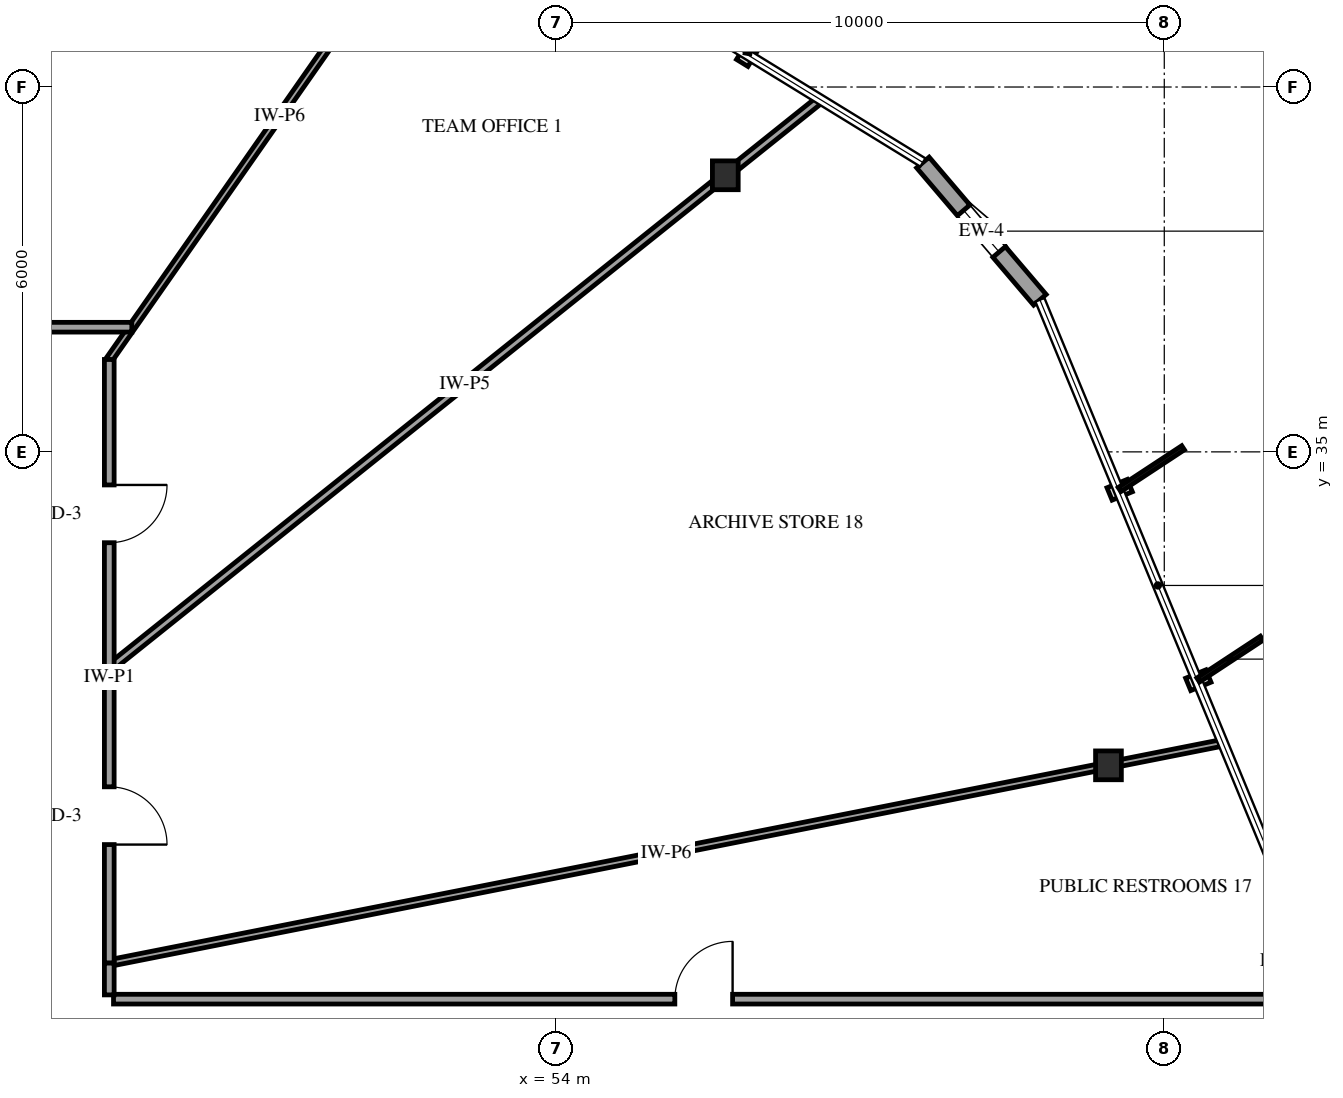
"""IFC4 building model, lengths in metres.
Left out: names, types, materials, properties, quantities, classifications, styles, units other than length and angle.
Written with IfcOpenShell. Run it as: python <this file> out.ifc"""

import sys

from ifc_helpers import new_model, si_unit, direction, frame, frame_2d, origin, origin_2d, place, context, subcontext, project, spatial, rectangle, i_section, extrude, element, fill, save


model = new_model("IFC4")
c1 = context("Model", 3, precision=1e-05, world=origin(), true_north=direction((0.0, 1.0)))
c2 = subcontext(c1, "Body", "Model", "MODEL_VIEW")
j1 = project(units=[si_unit("LENGTHUNIT", "METRE"), si_unit("PLANEANGLEUNIT", "RADIAN")], contexts=[c1])
p1 = place(None, origin())
s1 = spatial("IfcSite", under=j1, at=p1, CompositionType="ELEMENT")
p2 = place(p1, origin())
s2 = spatial("IfcBuilding", under=s1, at=p2, CompositionType="ELEMENT")
p3 = place(p2, frame((0.0, 0.0, 50.6)))
s3 = spatial("IfcBuildingStorey", under=s2, at=p3, CompositionType="ELEMENT", Elevation=50.6)
for number, where, z_axis, x_axis in (
    (1, (63.082, 29.845, 0.0), (0.0, 0.0, 1.0), (1.0, 0.0, 0.0)),
    (2, (56.781, 39.548, 0.0), (0.0, 0.0, 1.0), (1.0, 0.0, 0.0)),
):
    element("IfcColumn", number, at=place(p3, frame(where, z_axis=z_axis, x_axis=x_axis)), inside=s3, PredefinedType="COLUMN", context=c2, shape_type="SweptSolid", body=[
        extrude(i_section(OverallWidth=0.424, OverallDepth=0.474, WebThickness=0.048, FlangeThickness=0.077, FilletRadius=0.038, at=origin_2d()), origin(), (0.0, 0.0, 1.0), 4.0),
    ])
p4 = place(p3, frame((61.955, 37.501, 0.0), z_axis=(0.0, 0.0, 1.0), x_axis=(-0.648613054241, 0.761118325799, 0.0)))
e3 = element("IfcWall", 3, at=p4, inside=s3, PredefinedType="SOLIDWALL", context=c2, shape_type="SweptSolid", body=[
    extrude(rectangle(XDim=2.967, YDim=0.27, at=frame_2d((1.483, 0.0))), origin(), (0.0, 0.0, 1.0), 3.079),
])
p5 = place(p4, frame((1.033, 0.0, 0.75)))
e4 = element("IfcOpeningElement", 4, at=p5, cuts=e3, PredefinedType="OPENING", context=c2, shape_type="SweptSolid", body=[
    extrude(rectangle(XDim=0.9, YDim=1.5, at=frame_2d((0.45, 0.75))), frame((0.0, 0.145, 0.0), z_axis=(0.0, -1.0, 0.0), x_axis=(1.0, 0.0, 0.0)), (0.0, 0.0, 1.0), 0.29),
])
p6 = place(p3, frame((46.72, 26.0, 0.0), z_axis=(0.0, 0.0, 1.0), x_axis=(1.0, 0.0, 0.0)))
e5 = element("IfcWall", 5, at=p6, inside=s3, PredefinedType="PARTITIONING", context=c2, shape_type="SweptSolid", body=[
    extrude(rectangle(XDim=19.412, YDim=0.16, at=frame_2d((9.706, 0.0))), origin(), (0.0, 0.0, 1.0), 3.7),
])
p7 = place(p6, frame((9.231, 0.0, 0.0)))
e6 = element("IfcOpeningElement", 6, at=p7, cuts=e5, PredefinedType="OPENING", context=c2, shape_type="SweptSolid", body=[
    extrude(rectangle(XDim=0.95, YDim=2.15, at=frame_2d((0.475, 1.075))), frame((0.0, 0.09, 0.0), z_axis=(0.0, -1.0, 0.0), x_axis=(1.0, 0.0, 0.0)), (0.0, 0.0, 1.0), 0.18),
])
p8 = place(p3, frame((46.65, 26.593, 0.0), z_axis=(0.0, 0.0, 1.0), x_axis=(0.980976030909, 0.194128892185, 0.0)))
e7 = element("IfcWall", 7, at=p8, inside=s3, PredefinedType="PARTITIONING", context=c2, shape_type="SweptSolid", body=[
    extrude(rectangle(XDim=18.668, YDim=0.11, at=frame_2d((9.334, 0.0))), origin(), (0.0, 0.0, 1.0), 2.995),
])
p9 = place(p3, frame((46.65, 31.442, 0.0), z_axis=(0.0, 0.0, 1.0), x_axis=(0.780833810494, 0.624738793728, 0.0)))
e8 = element("IfcWall", 8, at=p9, inside=s3, PredefinedType="PARTITIONING", context=c2, shape_type="SweptSolid", body=[
    extrude(rectangle(XDim=14.973, YDim=0.13, at=frame_2d((7.486, 0.0))), origin(), (0.0, 0.0, 1.0), 3.7),
])
p10 = place(p3, frame((46.65, 36.519, 0.0), z_axis=(0.0, 0.0, 1.0), x_axis=(0.572860774391, 0.819652690574, 0.0)))
e9 = element("IfcWall", 9, at=p10, inside=s3, PredefinedType="PARTITIONING", context=c2, shape_type="SweptSolid", body=[
    extrude(rectangle(XDim=9.781, YDim=0.11, at=frame_2d((4.89, 0.0))), origin(), (0.0, 0.0, 1.0), 3.7),
])
p11 = place(p3, frame((43.357, 37.05, 0.0), z_axis=(0.0, 0.0, 1.0), x_axis=(0.367202648998, 0.930140964891, 0.0)))
e10 = element("IfcWall", 10, at=p11, inside=s3, PredefinedType="PARTITIONING", context=c2, shape_type="SweptSolid", body=[
    extrude(rectangle(XDim=9.235, YDim=0.14, at=frame_2d((4.618, 0.0))), origin(), (0.0, 0.0, 1.0), 2.995),
])
p12 = place(p3, frame((46.65, 36.519, 0.0), z_axis=(0.0, 0.0, 1.0), x_axis=(0.0, -1.0, 0.0)))
e11 = element("IfcWall", 11, at=p12, inside=s3, PredefinedType="PARTITIONING", context=c2, shape_type="SweptSolid", body=[
    extrude(rectangle(XDim=5.077, YDim=0.16, at=frame_2d((2.539, 0.0))), origin(), (0.0, 0.0, 1.0), 3.7),
])
p13 = place(p12, frame((2.063, 0.0, 0.0)))
e12 = element("IfcOpeningElement", 12, at=p13, cuts=e11, PredefinedType="OPENING", context=c2, shape_type="SweptSolid", body=[
    extrude(rectangle(XDim=0.95, YDim=2.15, at=frame_2d((0.475, 1.075))), frame((0.0, 0.09, 0.0), z_axis=(0.0, -1.0, 0.0), x_axis=(1.0, 0.0, 0.0)), (0.0, 0.0, 1.0), 0.18),
])
p14 = place(p3, frame((46.65, 31.442, 0.0), z_axis=(0.0, 0.0, 1.0), x_axis=(0.0, -1.0, 0.0)))
e13 = element("IfcWall", 13, at=p14, inside=s3, PredefinedType="PARTITIONING", context=c2, shape_type="SweptSolid", body=[
    extrude(rectangle(XDim=4.849, YDim=0.16, at=frame_2d((2.424, 0.0))), origin(), (0.0, 0.0, 1.0), 3.7),
])
p15 = place(p14, frame((1.95, 0.0, 0.0)))
e14 = element("IfcOpeningElement", 14, at=p15, cuts=e13, PredefinedType="OPENING", context=c2, shape_type="SweptSolid", body=[
    extrude(rectangle(XDim=0.95, YDim=2.15, at=frame_2d((0.475, 1.075))), frame((0.0, 0.09, 0.0), z_axis=(0.0, -1.0, 0.0), x_axis=(1.0, 0.0, 0.0)), (0.0, 0.0, 1.0), 0.18),
])
p16 = place(p3, frame((43.357, 37.05, 0.0), z_axis=(0.0, 0.0, 1.0), x_axis=(1.0, 0.0, 0.0)))
e15 = element("IfcWall", 15, at=p16, inside=s3, PredefinedType="PARTITIONING", context=c2, shape_type="SweptSolid", body=[
    extrude(rectangle(XDim=3.664, YDim=0.16, at=frame_2d((1.832, 0.0))), origin(), (0.0, 0.0, 1.0), 3.7),
])
p17 = place(p16, frame((1.357, 0.0, 0.0)))
e16 = element("IfcOpeningElement", 16, at=p17, cuts=e15, PredefinedType="OPENING", context=c2, shape_type="SweptSolid", body=[
    extrude(rectangle(XDim=0.95, YDim=2.15, at=frame_2d((0.475, 1.075))), frame((0.0, 0.09, 0.0), z_axis=(0.0, -1.0, 0.0), x_axis=(1.0, 0.0, 0.0)), (0.0, 0.0, 1.0), 0.18),
])
p18 = place(p3, frame((46.65, 26.593, 0.0), z_axis=(0.0, 0.0, 1.0), x_axis=(0.0, -1.0, 0.0)))
e17 = element("IfcWall", 17, at=p18, inside=s3, PredefinedType="PARTITIONING", context=c2, shape_type="SweptSolid", body=[
    extrude(rectangle(XDim=0.523, YDim=0.16, at=frame_2d((0.261, 0.0))), origin(), (0.0, 0.0, 1.0), 3.7),
])
p19 = place(p5, origin())
e18 = element("IfcWindow", 18, at=p19, inside=s3, PartitioningType="SINGLE_PANEL", PredefinedType="WINDOW", context=c2, shape_type="SweptSolid", body=[
    extrude(rectangle(XDim=0.9, YDim=1.5, at=frame_2d((0.45, 0.75))), frame((0.0, 0.03, 0.0), z_axis=(0.0, -1.0, 0.0), x_axis=(1.0, 0.0, 0.0)), (0.0, 0.0, 1.0), 0.06),
])
fill(e4, e18)
p20 = place(p7, origin())
e19 = element("IfcDoor", 19, at=p20, inside=s3, OperationType="SINGLE_SWING_RIGHT", PredefinedType="DOOR", context=c2, shape_type="SweptSolid", body=[
    extrude(rectangle(XDim=0.95, YDim=2.15, at=frame_2d((0.475, 1.075))), frame((0.0, 0.025, 0.0), z_axis=(0.0, -1.0, 0.0), x_axis=(1.0, 0.0, 0.0)), (0.0, 0.0, 1.0), 0.05),
])
fill(e6, e19)
p21 = place(p13, origin())
e20 = element("IfcDoor", 20, at=p21, inside=s3, OperationType="SINGLE_SWING_LEFT", PredefinedType="DOOR", context=c2, shape_type="SweptSolid", body=[
    extrude(rectangle(XDim=0.95, YDim=2.15, at=frame_2d((0.475, 1.075))), frame((0.0, 0.025, 0.0), z_axis=(0.0, -1.0, 0.0), x_axis=(1.0, 0.0, 0.0)), (0.0, 0.0, 1.0), 0.05),
])
fill(e12, e20)
p22 = place(p15, origin())
e21 = element("IfcDoor", 21, at=p22, inside=s3, OperationType="SINGLE_SWING_RIGHT", PredefinedType="DOOR", context=c2, shape_type="SweptSolid", body=[
    extrude(rectangle(XDim=0.95, YDim=2.15, at=frame_2d((0.475, 1.075))), frame((0.0, 0.025, 0.0), z_axis=(0.0, -1.0, 0.0), x_axis=(1.0, 0.0, 0.0)), (0.0, 0.0, 1.0), 0.05),
])
fill(e14, e21)
save(model, sys.argv[1])
